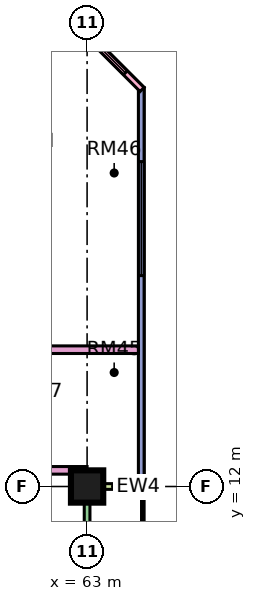
"""IFC4 building model, lengths in metres.
Left out: names, types, materials, properties, quantities, classifications, styles, units other than length and angle.
Written with IfcOpenShell. Run it as: python <this file> out.ifc"""

import sys

from ifc_helpers import new_model, si_unit, direction, frame, frame_2d, origin, origin_2d, place, context, subcontext, project, spatial, rectangle, extrude, element, fill, save


model = new_model("IFC4")
c1 = context("Model", 3, precision=1e-05, world=origin(), true_north=direction((0.0, 1.0)))
c2 = subcontext(c1, "Body", "Model", "MODEL_VIEW")
j1 = project(units=[si_unit("LENGTHUNIT", "METRE"), si_unit("PLANEANGLEUNIT", "RADIAN")], contexts=[c1])
p1 = place(None, origin())
s1 = spatial("IfcSite", under=j1, at=p1, CompositionType="ELEMENT")
p2 = place(p1, origin())
s2 = spatial("IfcBuilding", under=s1, at=p2, CompositionType="ELEMENT")
p3 = place(p2, frame((0.0, 0.0, 237.9)))
s3 = spatial("IfcBuildingStorey", under=s2, at=p3, CompositionType="ELEMENT", Elevation=237.9)
p4 = place(p3, frame((63.0, 12.0, 0.0), z_axis=(0.0, 0.0, 1.0), x_axis=(1.0, 0.0, 0.0)))
e1 = element("IfcColumn", 1, at=p4, inside=s3, PredefinedType="COLUMN", context=c2, shape_type="SweptSolid", body=[
    extrude(rectangle(XDim=0.85, YDim=0.85, at=origin_2d()), origin(), (0.0, 0.0, 1.0), 3.75),
])
p5 = place(p3, frame((63.0, 1.575, 0.0), z_axis=(0.0, 0.0, 1.0), x_axis=(0.0, 1.0, 0.0)))
e2 = element("IfcWall", 2, at=p5, inside=s3, PredefinedType="SOLIDWALL", context=c2, shape_type="SweptSolid", body=[
    extrude(rectangle(XDim=10.35, YDim=0.15, at=frame_2d((5.175, 0.0))), origin(), (0.0, 0.0, 1.0), 3.35),
])
p6 = place(p5, frame((2.425, 0.0, 0.0)))
e3 = element("IfcOpeningElement", 3, at=p6, cuts=e2, PredefinedType="OPENING", context=c2, shape_type="SweptSolid", body=[
    extrude(rectangle(XDim=1.8, YDim=2.4, at=frame_2d((0.9, 1.2))), frame((0.0, 0.085, 0.0), z_axis=(0.0, -1.0, 0.0), x_axis=(1.0, 0.0, 0.0)), (0.0, 0.0, 1.0), 0.17),
])
p7 = place(p5, frame((7.075, 0.0, 0.45)))
e4 = element("IfcOpeningElement", 4, at=p7, cuts=e2, PredefinedType="OPENING", context=c2, shape_type="SweptSolid", body=[
    extrude(rectangle(XDim=2.4, YDim=2.4, at=frame_2d((1.2, 1.2))), frame((0.0, 0.085, 0.0), z_axis=(0.0, -1.0, 0.0), x_axis=(1.0, 0.0, 0.0)), (0.0, 0.0, 1.0), 0.17),
])
p8 = place(p3, frame((64.5, 12.0, 0.0), z_axis=(0.0, 0.0, 1.0), x_axis=(-1.0, 0.0, 0.0)))
e5 = element("IfcWall", 5, at=p8, inside=s3, PredefinedType="SOLIDWALL", context=c2, shape_type="SweptSolid", body=[
    extrude(rectangle(XDim=1.5, YDim=0.15, at=frame_2d((0.75, 0.0))), origin(), (0.0, 0.0, 1.0), 3.35),
])
p9 = place(p3, frame((64.425, 12.075, 0.0), z_axis=(0.0, 0.0, 1.0), x_axis=(0.0, 1.0, 0.0)))
e6 = element("IfcWall", 6, at=p9, inside=s3, PredefinedType="SOLIDWALL", context=c2, shape_type="SweptSolid", body=[
    extrude(rectangle(XDim=10.425, YDim=0.15, at=frame_2d((5.212, 0.0))), origin(), (0.0, 0.0, 1.0), 3.35),
])
p10 = place(p9, frame((5.475, 0.0, 0.45)))
e7 = element("IfcOpeningElement", 7, at=p10, cuts=e6, PredefinedType="OPENING", context=c2, shape_type="SweptSolid", body=[
    extrude(rectangle(XDim=3.0, YDim=2.4, at=frame_2d((1.5, 1.2))), frame((0.0, 0.085, 0.0), z_axis=(0.0, -1.0, 0.0), x_axis=(1.0, 0.0, 0.0)), (0.0, 0.0, 1.0), 0.17),
])
p11 = place(p3, frame((64.447, 22.447, 0.0), z_axis=(0.0, 0.0, 1.0), x_axis=(-0.707106781187, 0.707106781187, 0.0)))
e8 = element("IfcWall", 8, at=p11, inside=s3, PredefinedType="SOLIDWALL", context=c2, shape_type="SweptSolid", body=[
    extrude(rectangle(XDim=4.243, YDim=0.15, at=frame_2d((2.121, 0.0))), origin(), (0.0, 0.0, 1.0), 3.35),
])
p12 = place(p11, frame((0.621, 0.0, 0.45)))
e9 = element("IfcOpeningElement", 9, at=p12, cuts=e8, PredefinedType="OPENING", context=c2, shape_type="SweptSolid", body=[
    extrude(rectangle(XDim=3.0, YDim=2.4, at=frame_2d((1.5, 1.2))), frame((0.0, 0.085, 0.0), z_axis=(0.0, -1.0, 0.0), x_axis=(1.0, 0.0, 0.0)), (0.0, 0.0, 1.0), 0.17),
])
p13 = place(p3, frame((40.65, 12.425, 0.0), z_axis=(0.0, 0.0, 1.0), x_axis=(1.0, 0.0, 0.0)))
e10 = element("IfcWall", 10, at=p13, inside=s3, PredefinedType="PARTITIONING", context=c2, shape_type="SweptSolid", body=[
    extrude(rectangle(XDim=22.35, YDim=0.2, at=frame_2d((11.175, 0.0))), origin(), (0.0, 0.0, 1.0), 3.35),
])
p14 = place(p13, frame((14.7, 0.0, 0.0)))
e11 = element("IfcOpeningElement", 11, at=p14, cuts=e10, PredefinedType="OPENING", context=c2, shape_type="SweptSolid", body=[
    extrude(rectangle(XDim=1.0, YDim=2.1, at=frame_2d((0.5, 1.05))), frame((0.0, 0.11, 0.0), z_axis=(0.0, -1.0, 0.0), x_axis=(1.0, 0.0, 0.0)), (0.0, 0.0, 1.0), 0.22),
])
p15 = place(p13, frame((1.05, 0.0, 0.0)))
e12 = element("IfcOpeningElement", 12, at=p15, cuts=e10, PredefinedType="OPENING", context=c2, shape_type="SweptSolid", body=[
    extrude(rectangle(XDim=1.0, YDim=2.1, at=frame_2d((0.5, 1.05))), frame((0.0, 0.11, 0.0), z_axis=(0.0, -1.0, 0.0), x_axis=(1.0, 0.0, 0.0)), (0.0, 0.0, 1.0), 0.22),
])
p16 = place(p3, frame((51.225, 15.6, 0.0), z_axis=(0.0, 0.0, 1.0), x_axis=(1.0, 0.0, 0.0)))
e13 = element("IfcWall", 13, at=p16, inside=s3, PredefinedType="PARTITIONING", context=c2, shape_type="SweptSolid", body=[
    extrude(rectangle(XDim=13.125, YDim=0.2, at=frame_2d((6.562, 0.0))), origin(), (0.0, 0.0, 1.0), 3.35),
])
p17 = place(p16, frame((9.725, 0.0, 0.0)))
e14 = element("IfcOpeningElement", 14, at=p17, cuts=e13, PredefinedType="OPENING", context=c2, shape_type="SweptSolid", body=[
    extrude(rectangle(XDim=1.0, YDim=2.1, at=frame_2d((0.5, 1.05))), frame((0.0, 0.11, 0.0), z_axis=(0.0, -1.0, 0.0), x_axis=(1.0, 0.0, 0.0)), (0.0, 0.0, 1.0), 0.22),
])
p18 = place(p16, frame((0.875, 0.0, 0.0)))
e15 = element("IfcOpeningElement", 15, at=p18, cuts=e13, PredefinedType="OPENING", context=c2, shape_type="SweptSolid", body=[
    extrude(rectangle(XDim=1.0, YDim=2.1, at=frame_2d((0.5, 1.05))), frame((0.0, 0.11, 0.0), z_axis=(0.0, -1.0, 0.0), x_axis=(1.0, 0.0, 0.0)), (0.0, 0.0, 1.0), 0.22),
])
p19 = place(p10, origin())
e16 = element("IfcWindow", 16, at=p19, inside=s3, PartitioningType="SINGLE_PANEL", PredefinedType="WINDOW", context=c2, shape_type="SweptSolid", body=[
    extrude(rectangle(XDim=3.0, YDim=2.4, at=frame_2d((1.5, 1.2))), frame((0.0, 0.03, 0.0), z_axis=(0.0, -1.0, 0.0), x_axis=(1.0, 0.0, 0.0)), (0.0, 0.0, 1.0), 0.06),
])
fill(e7, e16)
p20 = place(p12, origin())
e17 = element("IfcWindow", 17, at=p20, inside=s3, PartitioningType="SINGLE_PANEL", PredefinedType="WINDOW", context=c2, shape_type="SweptSolid", body=[
    extrude(rectangle(XDim=3.0, YDim=2.4, at=frame_2d((1.5, 1.2))), frame((0.0, 0.03, 0.0), z_axis=(0.0, -1.0, 0.0), x_axis=(1.0, 0.0, 0.0)), (0.0, 0.0, 1.0), 0.06),
])
fill(e9, e17)
save(model, sys.argv[1])
